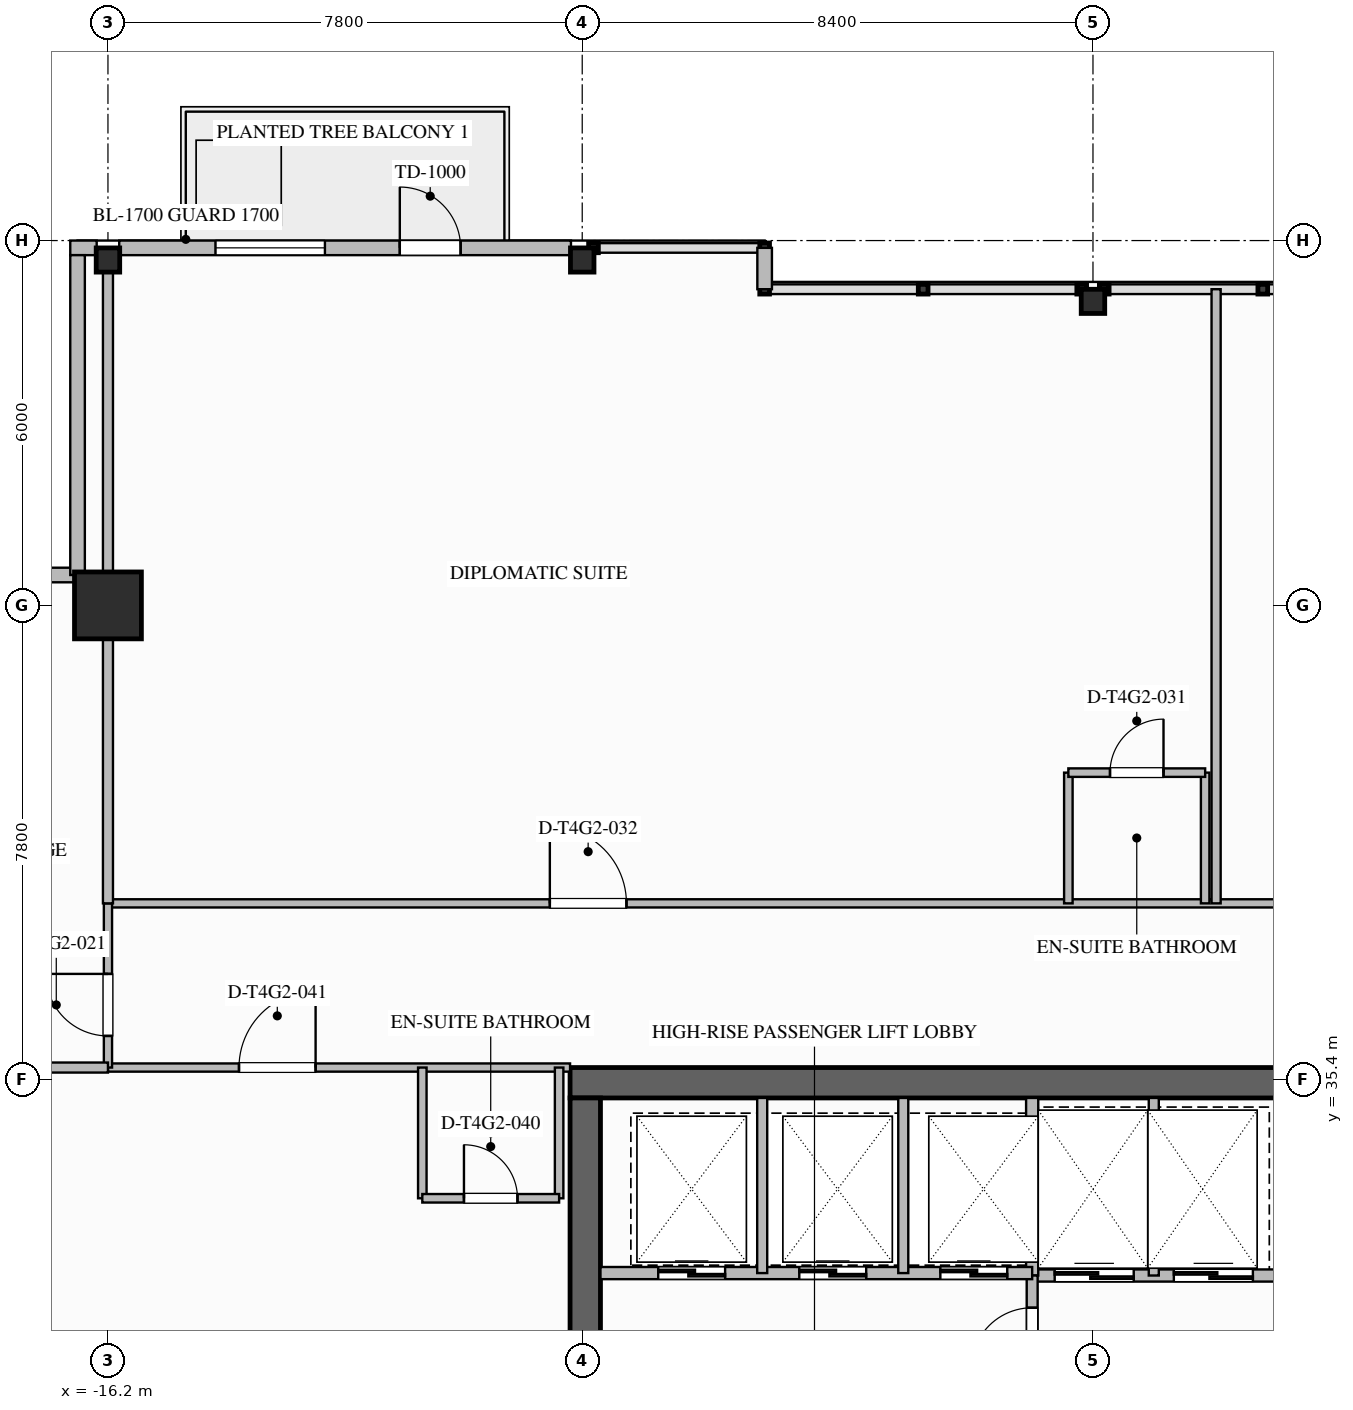
"""IFC4 building model, lengths in metres.
Left out: names, types, materials, properties, quantities, classifications, styles, units other than length and angle.
Written with IfcOpenShell. Run it as: python <this file> out.ifc"""

import sys

from ifc_helpers import new_model, si_unit, direction, frame, frame_2d, origin, origin_2d, place, context, subcontext, project, spatial, rectangle, i_section, extrude, element, fill, save


model = new_model("IFC4")
c1 = context("Model", 3, precision=1e-05, world=origin(), true_north=direction((0.0, 1.0)))
c2 = subcontext(c1, "Body", "Model", "MODEL_VIEW")
j1 = project(units=[si_unit("LENGTHUNIT", "METRE"), si_unit("PLANEANGLEUNIT", "RADIAN")], contexts=[c1])
p1 = place(None, origin())
s1 = spatial("IfcSite", under=j1, at=p1, CompositionType="ELEMENT")
p2 = place(p1, origin())
s2 = spatial("IfcBuilding", under=s1, at=p2, CompositionType="ELEMENT")
p3 = place(p2, frame((0.0, 0.0, 215.9)))
s3 = spatial("IfcBuildingStorey", under=s2, at=p3, CompositionType="ELEMENT", Elevation=215.9)
p4 = place(p3, frame((-8.6, 35.35, 0.0), z_axis=(0.0, 0.0, 1.0), x_axis=(1.0, 0.0, 0.0)))
e1 = element("IfcWall", 1, at=p4, inside=s3, PredefinedType="SHEAR", context=c2, shape_type="SweptSolid", body=[
    extrude(rectangle(XDim=17.2, YDim=0.5, at=frame_2d((8.6, 0.0))), origin(), (0.0, 0.0, 1.0), 3.6),
])
p5 = place(p3, frame((-8.35, 18.9, 0.0), z_axis=(0.0, 0.0, 1.0), x_axis=(0.0, 1.0, 0.0)))
e2 = element("IfcWall", 2, at=p5, inside=s3, PredefinedType="SHEAR", context=c2, shape_type="SweptSolid", body=[
    extrude(rectangle(XDim=16.2, YDim=0.5, at=frame_2d((8.1, 0.0))), origin(), (0.0, 0.0, 1.0), 3.6),
])
p6 = place(p3, frame((-16.2, 43.2, 0.0), z_axis=(0.0, 0.0, 1.0), x_axis=(1.0, 0.0, 0.0)))
e3 = element("IfcColumn", 3, at=p6, inside=s3, PredefinedType="COLUMN", context=c2, shape_type="SweptSolid", body=[
    extrude(rectangle(XDim=1.1, YDim=1.1, at=origin_2d()), origin(), (0.0, 0.0, 1.0), 3.6),
])
for number, where, z_axis, x_axis in (
    (4, (-16.2, 48.88, 0.0), (0.0, 0.0, 1.0), (0.0, 1.0, 0.0)),
    (5, (-8.4, 48.88, 0.0), (0.0, 0.0, 1.0), (0.0, 1.0, 0.0)),
    (6, (0.0, 48.2, 0.0), (0.0, 0.0, 1.0), (0.0, 1.0, 0.0)),
):
    element("IfcColumn", number, at=place(p3, frame(where, z_axis=z_axis, x_axis=x_axis)), inside=s3, PredefinedType="COLUMN", context=c2, shape_type="SweptSolid", body=[
        extrude(i_section(OverallWidth=0.397, OverallDepth=0.387, WebThickness=0.021, FlangeThickness=0.033, FilletRadius=0.025, at=origin_2d()), origin(), (0.0, 0.0, 1.0), 3.597),
    ])
p7 = place(p3, frame((-16.82, 49.08, 0.0), z_axis=(0.0, 0.0, 1.0), x_axis=(1.0, 0.0, 0.0)))
e7 = element("IfcWall", 7, at=p7, inside=s3, PredefinedType="STANDARD", context=c2, shape_type="SweptSolid", body=[
    extrude(rectangle(XDim=0.435, YDim=0.24, at=frame_2d((0.217, 0.0))), origin(), (0.0, 0.0, 1.0), 3.34),
])
p8 = place(p3, frame((-16.015, 49.08, 0.0), z_axis=(0.0, 0.0, 1.0), x_axis=(1.0, 0.0, 0.0)))
e8 = element("IfcWall", 8, at=p8, inside=s3, PredefinedType="STANDARD", context=c2, shape_type="SweptSolid", body=[
    extrude(rectangle(XDim=7.429, YDim=0.24, at=frame_2d((3.715, 0.0))), origin(), (0.0, 0.0, 1.0), 2.803),
])
p9 = place(p8, frame((4.615, 0.0, 0.0)))
e9 = element("IfcOpeningElement", 9, at=p9, cuts=e8, PredefinedType="OPENING", context=c2, shape_type="SweptSolid", body=[
    extrude(rectangle(XDim=1.0, YDim=2.2, at=frame_2d((0.5, 1.1))), frame((0.0, 0.13, 0.0), z_axis=(0.0, -1.0, 0.0), x_axis=(1.0, 0.0, 0.0)), (0.0, 0.0, 1.0), 0.26),
])
p10 = place(p8, frame((1.583, 0.0, 0.75)))
e10 = element("IfcOpeningElement", 10, at=p10, cuts=e8, PredefinedType="OPENING", context=c2, shape_type="SweptSolid", body=[
    extrude(rectangle(XDim=1.8, YDim=1.953, at=frame_2d((0.9, 0.977))), frame((0.0, 0.13, 0.0), z_axis=(0.0, -1.0, 0.0), x_axis=(1.0, 0.0, 0.0)), (0.0, 0.0, 1.0), 0.26),
])
for number, where, z_axis, x_axis in (
    (11, (-21.96, 43.7, 0.0), (0.0, 0.0, 1.0), (1.0, 0.0, 0.0)),
    (12, (-16.7, 43.7, 0.0), (0.0, 0.0, 1.0), (0.0, 1.0, 0.0)),
):
    element("IfcWall", number, at=place(p3, frame(where, z_axis=z_axis, x_axis=x_axis)), inside=s3, PredefinedType="STANDARD", context=c2, shape_type="SweptSolid", body=[
        extrude(rectangle(XDim=5.26, YDim=0.24, at=frame_2d((2.63, 0.0))), origin(), (0.0, 0.0, 1.0), 3.34),
    ])
p11 = place(p3, frame((-5.4, 49.08, 0.0), z_axis=(0.0, 0.0, 1.0), x_axis=(0.0, -1.0, 0.0)))
e13 = element("IfcWall", 13, at=p11, inside=s3, PredefinedType="STANDARD", context=c2, shape_type="SweptSolid", body=[
    extrude(rectangle(XDim=0.68, YDim=0.24, at=frame_2d((0.34, 0.0))), origin(), (0.0, 0.0, 1.0), 3.34),
])
p12 = place(p3, frame((-1.0, 32.18, 0.0), z_axis=(0.0, 0.0, 1.0), x_axis=(1.0, 0.0, 0.0)))
e14 = element("IfcWall", 14, at=p12, inside=s3, PredefinedType="SOLIDWALL", context=c2, shape_type="SweptSolid", body=[
    extrude(rectangle(XDim=4.1, YDim=0.2, at=frame_2d((2.05, 0.0))), origin(), (0.0, 0.0, 1.0), 3.34),
])
p13 = place(p12, frame((0.37, 0.0, 0.0)))
e15 = element("IfcOpeningElement", 15, at=p13, cuts=e14, PredefinedType="OPENING", context=c2, shape_type="SweptSolid", body=[
    extrude(rectangle(XDim=1.3, YDim=2.2, at=frame_2d((0.65, 1.1))), frame((0.0, 0.11, 0.0), z_axis=(0.0, -1.0, 0.0), x_axis=(1.0, 0.0, 0.0)), (0.0, 0.0, 1.0), 0.22),
])
p14 = place(p12, frame((2.33, 0.0, 0.0)))
e16 = element("IfcOpeningElement", 16, at=p14, cuts=e14, PredefinedType="OPENING", context=c2, shape_type="SweptSolid", body=[
    extrude(rectangle(XDim=1.3, YDim=2.2, at=frame_2d((0.65, 1.1))), frame((0.0, 0.11, 0.0), z_axis=(0.0, -1.0, 0.0), x_axis=(1.0, 0.0, 0.0)), (0.0, 0.0, 1.0), 0.22),
])
p15 = place(p3, frame((-1.0, 32.18, 0.0), z_axis=(0.0, 0.0, 1.0), x_axis=(0.0, 1.0, 0.0)))
e17 = element("IfcWall", 17, at=p15, inside=s3, PredefinedType="SOLIDWALL", context=c2, shape_type="SweptSolid", body=[
    extrude(rectangle(XDim=2.92, YDim=0.2, at=frame_2d((1.46, 0.0))), origin(), (0.0, 0.0, 1.0), 3.34),
])
p16 = place(p3, frame((1.0, 32.18, 0.0), z_axis=(0.0, 0.0, 1.0), x_axis=(0.0, 1.0, 0.0)))
e18 = element("IfcWall", 18, at=p16, inside=s3, PredefinedType="PARTITIONING", context=c2, shape_type="SweptSolid", body=[
    extrude(rectangle(XDim=2.92, YDim=0.165, at=frame_2d((1.46, 0.0))), origin(), (0.0, 0.0, 1.0), 3.34),
])
p17 = place(p3, frame((-1.0, 28.16, 0.0), z_axis=(0.0, 0.0, 1.0), x_axis=(0.0, 1.0, 0.0)))
e19 = element("IfcWall", 19, at=p17, inside=s3, PredefinedType="SOLIDWALL", context=c2, shape_type="SweptSolid", body=[
    extrude(rectangle(XDim=4.02, YDim=0.18, at=frame_2d((2.01, 0.0))), origin(), (0.0, 0.0, 1.0), 3.34),
])
p18 = place(p17, frame((2.49, 0.0, 0.0)))
e20 = element("IfcOpeningElement", 20, at=p18, cuts=e19, PredefinedType="OPENING", context=c2, shape_type="SweptSolid", body=[
    extrude(rectangle(XDim=1.0, YDim=2.1, at=frame_2d((0.5, 1.05))), frame((0.0, 0.1, 0.0), z_axis=(0.0, -1.0, 0.0), x_axis=(1.0, 0.0, 0.0)), (0.0, 0.0, 1.0), 0.2),
])
p19 = place(p3, frame((-8.1, 32.22, 0.0), z_axis=(0.0, 0.0, 1.0), x_axis=(1.0, 0.0, 0.0)))
e21 = element("IfcWall", 21, at=p19, inside=s3, PredefinedType="SOLIDWALL", context=c2, shape_type="SweptSolid", body=[
    extrude(rectangle(XDim=7.1, YDim=0.2, at=frame_2d((3.55, 0.0))), origin(), (0.0, 0.0, 1.0), 3.34),
])
p20 = place(p19, frame((0.95, 0.0, 0.0)))
e22 = element("IfcOpeningElement", 22, at=p20, cuts=e21, PredefinedType="OPENING", context=c2, shape_type="SweptSolid", body=[
    extrude(rectangle(XDim=1.1, YDim=2.2, at=frame_2d((0.55, 1.1))), frame((0.0, 0.11, 0.0), z_axis=(0.0, -1.0, 0.0), x_axis=(1.0, 0.0, 0.0)), (0.0, 0.0, 1.0), 0.22),
])
p21 = place(p19, frame((3.27, 0.0, 0.0)))
e23 = element("IfcOpeningElement", 23, at=p21, cuts=e21, PredefinedType="OPENING", context=c2, shape_type="SweptSolid", body=[
    extrude(rectangle(XDim=1.1, YDim=2.2, at=frame_2d((0.55, 1.1))), frame((0.0, 0.11, 0.0), z_axis=(0.0, -1.0, 0.0), x_axis=(1.0, 0.0, 0.0)), (0.0, 0.0, 1.0), 0.22),
])
p22 = place(p19, frame((5.59, 0.0, 0.0)))
e24 = element("IfcOpeningElement", 24, at=p22, cuts=e21, PredefinedType="OPENING", context=c2, shape_type="SweptSolid", body=[
    extrude(rectangle(XDim=1.1, YDim=2.2, at=frame_2d((0.55, 1.1))), frame((0.0, 0.11, 0.0), z_axis=(0.0, -1.0, 0.0), x_axis=(1.0, 0.0, 0.0)), (0.0, 0.0, 1.0), 0.22),
])
for number, where, z_axis, x_axis in (
    (25, (-5.44, 32.22, 0.0), (0.0, 0.0, 1.0), (0.0, 1.0, 0.0)),
    (26, (-3.12, 32.22, 0.0), (0.0, 0.0, 1.0), (0.0, 1.0, 0.0)),
):
    element("IfcWall", number, at=place(p3, frame(where, z_axis=z_axis, x_axis=x_axis)), inside=s3, PredefinedType="PARTITIONING", context=c2, shape_type="SweptSolid", body=[
        extrude(rectangle(XDim=2.88, YDim=0.165, at=frame_2d((1.44, 0.0))), origin(), (0.0, 0.0, 1.0), 3.34),
    ])
p23 = place(p3, frame((-16.2, 38.3, 0.0), z_axis=(0.0, 0.0, 1.0), x_axis=(1.0, 0.0, 0.0)))
e27 = element("IfcWall", 27, at=p23, inside=s3, PredefinedType="PARTITIONING", context=c2, shape_type="SweptSolid", body=[
    extrude(rectangle(XDim=38.28, YDim=0.135, at=frame_2d((19.14, 0.0))), origin(), (0.0, 0.0, 1.0), 3.34),
])
p24 = place(p23, frame((33.355, 0.0, 0.0)))
e28 = element("IfcOpeningElement", 28, at=p24, cuts=e27, PredefinedType="OPENING", context=c2, shape_type="SweptSolid", body=[
    extrude(rectangle(XDim=1.26, YDim=2.2, at=frame_2d((0.63, 1.1))), frame((0.0, 0.077, 0.0), z_axis=(0.0, -1.0, 0.0), x_axis=(1.0, 0.0, 0.0)), (0.0, 0.0, 1.0), 0.155),
])
p25 = place(p23, frame((7.268, 0.0, 0.0)))
e29 = element("IfcOpeningElement", 29, at=p25, cuts=e27, PredefinedType="OPENING", context=c2, shape_type="SweptSolid", body=[
    extrude(rectangle(XDim=1.26, YDim=2.2, at=frame_2d((0.63, 1.1))), frame((0.0, 0.077, 0.0), z_axis=(0.0, -1.0, 0.0), x_axis=(1.0, 0.0, 0.0)), (0.0, 0.0, 1.0), 0.155),
])
p26 = place(p23, frame((23.468, 0.0, 0.0)))
e30 = element("IfcOpeningElement", 30, at=p26, cuts=e27, PredefinedType="OPENING", context=c2, shape_type="SweptSolid", body=[
    extrude(rectangle(XDim=1.26, YDim=2.2, at=frame_2d((0.63, 1.1))), frame((0.0, 0.077, 0.0), z_axis=(0.0, -1.0, 0.0), x_axis=(1.0, 0.0, 0.0)), (0.0, 0.0, 1.0), 0.155),
])
p27 = place(p3, frame((-16.2, 35.6, 0.0), z_axis=(0.0, 0.0, 1.0), x_axis=(1.0, 0.0, 0.0)))
e31 = element("IfcWall", 31, at=p27, inside=s3, PredefinedType="PARTITIONING", context=c2, shape_type="SweptSolid", body=[
    extrude(rectangle(XDim=7.6, YDim=0.135, at=frame_2d((3.8, 0.0))), origin(), (0.0, 0.0, 1.0), 2.718),
])
p28 = place(p27, frame((2.155, 0.0, 0.0)))
e32 = element("IfcOpeningElement", 32, at=p28, cuts=e31, PredefinedType="OPENING", context=c2, shape_type="SweptSolid", body=[
    extrude(rectangle(XDim=1.26, YDim=2.2, at=frame_2d((0.63, 1.1))), frame((0.0, 0.077, 0.0), z_axis=(0.0, -1.0, 0.0), x_axis=(1.0, 0.0, 0.0)), (0.0, 0.0, 1.0), 0.155),
])
p29 = place(p3, frame((-16.2, 35.6, 0.0), z_axis=(0.0, 0.0, 1.0), x_axis=(0.0, 1.0, 0.0)))
e33 = element("IfcWall", 33, at=p29, inside=s3, PredefinedType="PARTITIONING", context=c2, shape_type="SweptSolid", body=[
    extrude(rectangle(XDim=2.7, YDim=0.135, at=frame_2d((1.35, 0.0))), origin(), (0.0, 0.0, 1.0), 2.714),
])
p30 = place(p29, frame((0.52, 0.0, 0.0)))
e34 = element("IfcOpeningElement", 34, at=p30, cuts=e33, PredefinedType="OPENING", context=c2, shape_type="SweptSolid", body=[
    extrude(rectangle(XDim=1.02, YDim=2.15, at=frame_2d((0.51, 1.075))), frame((0.0, 0.077, 0.0), z_axis=(0.0, -1.0, 0.0), x_axis=(1.0, 0.0, 0.0)), (0.0, 0.0, 1.0), 0.155),
])
p31 = place(p3, frame((-16.2, 38.3, 0.0), z_axis=(0.0, 0.0, 1.0), x_axis=(0.0, 1.0, 0.0)))
e35 = element("IfcWall", 35, at=p31, inside=s3, PredefinedType="PARTITIONING", context=c2, shape_type="SweptSolid", body=[
    extrude(rectangle(XDim=10.78, YDim=0.165, at=frame_2d((5.39, 0.0))), origin(), (0.0, 0.0, 1.0), 2.714),
])
p32 = place(p3, frame((-22.08, 35.6, 0.0), z_axis=(0.0, 0.0, 1.0), x_axis=(1.0, 0.0, 0.0)))
e36 = element("IfcWall", 36, at=p32, inside=s3, PredefinedType="PARTITIONING", context=c2, shape_type="SweptSolid", body=[
    extrude(rectangle(XDim=5.88, YDim=0.165, at=frame_2d((2.94, 0.0))), origin(), (0.0, 0.0, 1.0), 2.714),
])
for number, where, z_axis, x_axis in (
    (37, (-0.405, 38.3, 0.0), (0.0, 0.0, 1.0), (0.0, 1.0, 0.0)),
    (38, (1.845, 38.3, 0.0), (0.0, 0.0, 1.0), (0.0, 1.0, 0.0)),
):
    element("IfcWall", number, at=place(p3, frame(where, z_axis=z_axis, x_axis=x_axis)), inside=s3, PredefinedType="PLUMBINGWALL", context=c2, shape_type="SweptSolid", body=[
        extrude(rectangle(XDim=2.15, YDim=0.14, at=frame_2d((1.075, 0.0))), origin(), (0.0, 0.0, 1.0), 3.34),
    ])
p33 = place(p3, frame((-0.405, 40.45, 0.0), z_axis=(0.0, 0.0, 1.0), x_axis=(1.0, 0.0, 0.0)))
e39 = element("IfcWall", 39, at=p33, inside=s3, PredefinedType="PLUMBINGWALL", context=c2, shape_type="SweptSolid", body=[
    extrude(rectangle(XDim=2.25, YDim=0.14, at=frame_2d((1.125, 0.0))), origin(), (0.0, 0.0, 1.0), 3.34),
])
p34 = place(p33, frame((0.685, 0.0, 0.0)))
e40 = element("IfcOpeningElement", 40, at=p34, cuts=e39, PredefinedType="OPENING", context=c2, shape_type="SweptSolid", body=[
    extrude(rectangle(XDim=0.88, YDim=2.1, at=frame_2d((0.44, 1.05))), frame((0.0, 0.08, 0.0), z_axis=(0.0, -1.0, 0.0), x_axis=(1.0, 0.0, 0.0)), (0.0, 0.0, 1.0), 0.16),
])
p35 = place(p3, frame((2.025, 38.3, 0.0), z_axis=(0.0, 0.0, 1.0), x_axis=(0.0, 1.0, 0.0)))
e41 = element("IfcWall", 41, at=p35, inside=s3, PredefinedType="PARTITIONING", context=c2, shape_type="SweptSolid", body=[
    extrude(rectangle(XDim=10.1, YDim=0.15, at=frame_2d((5.05, 0.0))), origin(), (0.0, 0.0, 1.0), 3.34),
])
for number, where, z_axis, x_axis in (
    (42, (-11.03, 35.6, 0.0), (0.0, 0.0, 1.0), (0.0, -1.0, 0.0)),
    (43, (-8.78, 35.6, 0.0), (0.0, 0.0, 1.0), (0.0, -1.0, 0.0)),
):
    element("IfcWall", number, at=place(p3, frame(where, z_axis=z_axis, x_axis=x_axis)), inside=s3, PredefinedType="PLUMBINGWALL", context=c2, shape_type="SweptSolid", body=[
        extrude(rectangle(XDim=2.15, YDim=0.14, at=frame_2d((1.075, 0.0))), origin(), (0.0, 0.0, 1.0), 3.34),
    ])
p36 = place(p3, frame((-11.03, 33.45, 0.0), z_axis=(0.0, 0.0, 1.0), x_axis=(1.0, 0.0, 0.0)))
e44 = element("IfcWall", 44, at=p36, inside=s3, PredefinedType="PLUMBINGWALL", context=c2, shape_type="SweptSolid", body=[
    extrude(rectangle(XDim=2.25, YDim=0.14, at=frame_2d((1.125, 0.0))), origin(), (0.0, 0.0, 1.0), 3.34),
])
p37 = place(p36, frame((0.685, 0.0, 0.0)))
e45 = element("IfcOpeningElement", 45, at=p37, cuts=e44, PredefinedType="OPENING", context=c2, shape_type="SweptSolid", body=[
    extrude(rectangle(XDim=0.88, YDim=2.1, at=frame_2d((0.44, 1.05))), frame((0.0, 0.08, 0.0), z_axis=(0.0, -1.0, 0.0), x_axis=(1.0, 0.0, 0.0)), (0.0, 0.0, 1.0), 0.16),
])
p38 = place(p9, origin())
e46 = element("IfcDoor", 46, at=p38, inside=s3, OperationType="SINGLE_SWING_LEFT", PredefinedType="DOOR", context=c2, shape_type="SweptSolid", body=[
    extrude(rectangle(XDim=1.0, YDim=2.2, at=frame_2d((0.5, 1.1))), frame((0.0, 0.025, 0.0), z_axis=(0.0, -1.0, 0.0), x_axis=(1.0, 0.0, 0.0)), (0.0, 0.0, 1.0), 0.05),
])
fill(e9, e46)
p39 = place(p10, origin())
e47 = element("IfcWindow", 47, at=p39, inside=s3, PartitioningType="SINGLE_PANEL", PredefinedType="WINDOW", context=c2, shape_type="SweptSolid", body=[
    extrude(rectangle(XDim=1.8, YDim=1.953, at=frame_2d((0.9, 0.977))), frame((0.0, 0.03, 0.0), z_axis=(0.0, -1.0, 0.0), x_axis=(1.0, 0.0, 0.0)), (0.0, 0.0, 1.0), 0.06),
])
fill(e10, e47)
p40 = place(p13, origin())
e48 = element("IfcDoor", 48, at=p40, inside=s3, OperationType="SLIDING_TO_LEFT", PredefinedType="DOOR", context=c2, shape_type="SweptSolid", body=[
    extrude(rectangle(XDim=1.3, YDim=2.2, at=frame_2d((0.65, 1.1))), frame((0.0, 0.025, 0.0), z_axis=(0.0, -1.0, 0.0), x_axis=(1.0, 0.0, 0.0)), (0.0, 0.0, 1.0), 0.05),
])
fill(e15, e48)
p41 = place(p14, origin())
e49 = element("IfcDoor", 49, at=p41, inside=s3, OperationType="SLIDING_TO_LEFT", PredefinedType="DOOR", context=c2, shape_type="SweptSolid", body=[
    extrude(rectangle(XDim=1.3, YDim=2.2, at=frame_2d((0.65, 1.1))), frame((0.0, 0.025, 0.0), z_axis=(0.0, -1.0, 0.0), x_axis=(1.0, 0.0, 0.0)), (0.0, 0.0, 1.0), 0.05),
])
fill(e16, e49)
p42 = place(p18, origin())
e50 = element("IfcDoor", 50, at=p42, inside=s3, OperationType="SINGLE_SWING_LEFT", PredefinedType="DOOR", context=c2, shape_type="SweptSolid", body=[
    extrude(rectangle(XDim=1.0, YDim=2.1, at=frame_2d((0.5, 1.05))), frame((0.0, 0.025, 0.0), z_axis=(0.0, -1.0, 0.0), x_axis=(1.0, 0.0, 0.0)), (0.0, 0.0, 1.0), 0.05),
])
fill(e20, e50)
p43 = place(p20, origin())
e51 = element("IfcDoor", 51, at=p43, inside=s3, OperationType="SLIDING_TO_LEFT", PredefinedType="DOOR", context=c2, shape_type="SweptSolid", body=[
    extrude(rectangle(XDim=1.1, YDim=2.2, at=frame_2d((0.55, 1.1))), frame((0.0, 0.025, 0.0), z_axis=(0.0, -1.0, 0.0), x_axis=(1.0, 0.0, 0.0)), (0.0, 0.0, 1.0), 0.05),
])
fill(e22, e51)
p44 = place(p21, origin())
e52 = element("IfcDoor", 52, at=p44, inside=s3, OperationType="SLIDING_TO_LEFT", PredefinedType="DOOR", context=c2, shape_type="SweptSolid", body=[
    extrude(rectangle(XDim=1.1, YDim=2.2, at=frame_2d((0.55, 1.1))), frame((0.0, 0.025, 0.0), z_axis=(0.0, -1.0, 0.0), x_axis=(1.0, 0.0, 0.0)), (0.0, 0.0, 1.0), 0.05),
])
fill(e23, e52)
p45 = place(p22, origin())
e53 = element("IfcDoor", 53, at=p45, inside=s3, OperationType="SLIDING_TO_LEFT", PredefinedType="DOOR", context=c2, shape_type="SweptSolid", body=[
    extrude(rectangle(XDim=1.1, YDim=2.2, at=frame_2d((0.55, 1.1))), frame((0.0, 0.025, 0.0), z_axis=(0.0, -1.0, 0.0), x_axis=(1.0, 0.0, 0.0)), (0.0, 0.0, 1.0), 0.05),
])
fill(e24, e53)
p46 = place(p30, origin())
e54 = element("IfcDoor", 54, at=p46, inside=s3, OperationType="SINGLE_SWING_RIGHT", PredefinedType="DOOR", context=c2, shape_type="SweptSolid", body=[
    extrude(rectangle(XDim=1.02, YDim=2.15, at=frame_2d((0.51, 1.075))), frame((0.0, 0.025, 0.0), z_axis=(0.0, -1.0, 0.0), x_axis=(1.0, 0.0, 0.0)), (0.0, 0.0, 1.0), 0.05),
])
fill(e34, e54)
p47 = place(p34, origin())
e55 = element("IfcDoor", 55, at=p47, inside=s3, OperationType="SINGLE_SWING_RIGHT", PredefinedType="DOOR", context=c2, shape_type="SweptSolid", body=[
    extrude(rectangle(XDim=0.88, YDim=2.1, at=frame_2d((0.44, 1.05))), frame((0.0, 0.025, 0.0), z_axis=(0.0, -1.0, 0.0), x_axis=(1.0, 0.0, 0.0)), (0.0, 0.0, 1.0), 0.05),
])
fill(e40, e55)
p48 = place(p25, origin())
e56 = element("IfcDoor", 56, at=p48, inside=s3, OperationType="SINGLE_SWING_LEFT", PredefinedType="DOOR", context=c2, shape_type="SweptSolid", body=[
    extrude(rectangle(XDim=1.26, YDim=2.2, at=frame_2d((0.63, 1.1))), frame((0.0, 0.025, 0.0), z_axis=(0.0, -1.0, 0.0), x_axis=(1.0, 0.0, 0.0)), (0.0, 0.0, 1.0), 0.05),
])
fill(e29, e56)
p49 = place(p37, origin())
e57 = element("IfcDoor", 57, at=p49, inside=s3, OperationType="SINGLE_SWING_LEFT", PredefinedType="DOOR", context=c2, shape_type="SweptSolid", body=[
    extrude(rectangle(XDim=0.88, YDim=2.1, at=frame_2d((0.44, 1.05))), frame((0.0, 0.025, 0.0), z_axis=(0.0, -1.0, 0.0), x_axis=(1.0, 0.0, 0.0)), (0.0, 0.0, 1.0), 0.05),
])
fill(e45, e57)
p50 = place(p28, origin())
e58 = element("IfcDoor", 58, at=p50, inside=s3, OperationType="SINGLE_SWING_RIGHT", PredefinedType="DOOR", context=c2, shape_type="SweptSolid", body=[
    extrude(rectangle(XDim=1.26, YDim=2.2, at=frame_2d((0.63, 1.1))), frame((0.0, 0.025, 0.0), z_axis=(0.0, -1.0, 0.0), x_axis=(1.0, 0.0, 0.0)), (0.0, 0.0, 1.0), 0.05),
])
fill(e32, e58)
save(model, sys.argv[1])
